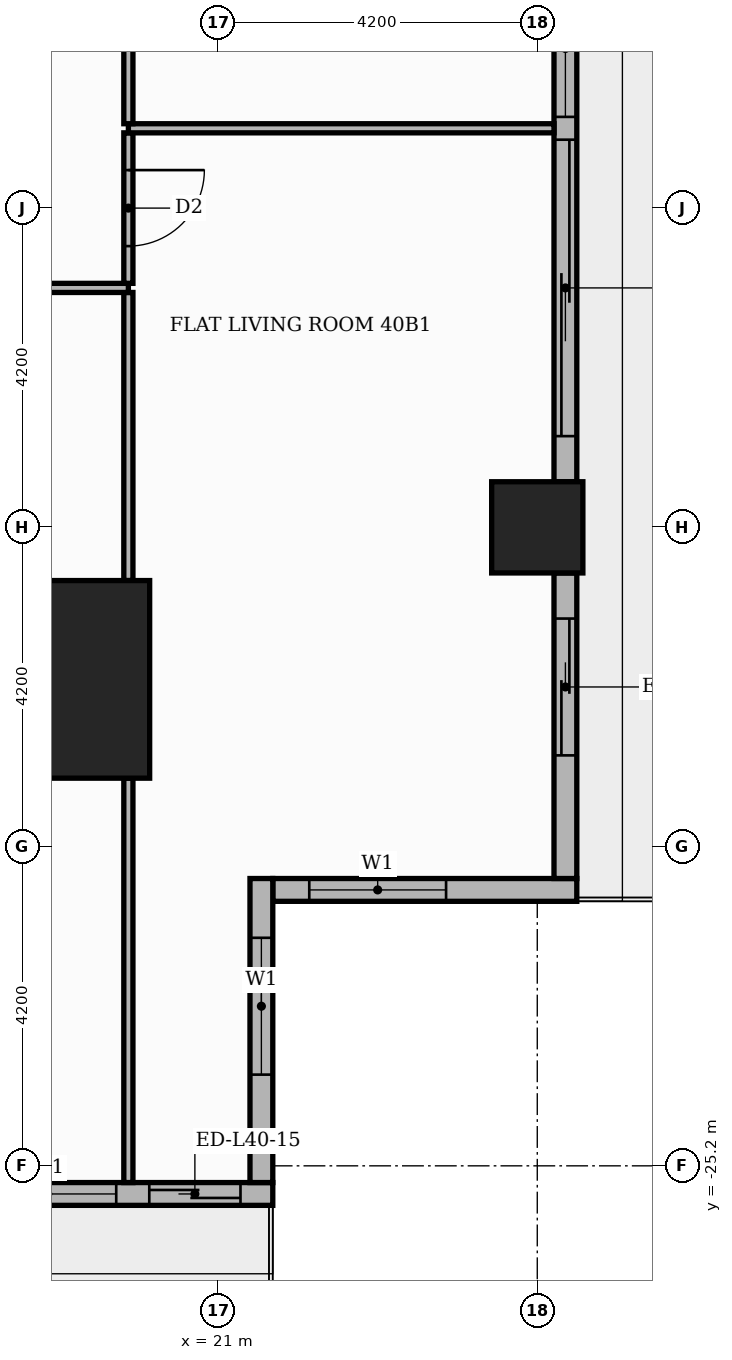
"""IFC4 building model, lengths in metres.
Left out: names, types, materials, properties, quantities, classifications, styles, units other than length and angle.
Written with IfcOpenShell. Run it as: python <this file> out.ifc"""

import sys

from ifc_helpers import new_model, si_unit, direction, frame, frame_2d, origin, origin_2d, place, context, subcontext, project, spatial, rectangle, extrude, element, fill, save


model = new_model("IFC4")
c1 = context("Model", 3, precision=1e-05, world=origin(), true_north=direction((0.0, 1.0)))
c2 = subcontext(c1, "Body", "Model", "MODEL_VIEW")
j1 = project(units=[si_unit("LENGTHUNIT", "METRE"), si_unit("PLANEANGLEUNIT", "RADIAN")], contexts=[c1])
p1 = place(None, origin())
s1 = spatial("IfcSite", under=j1, at=p1, CompositionType="ELEMENT")
p2 = place(p1, origin())
s2 = spatial("IfcBuilding", under=s1, at=p2, CompositionType="ELEMENT")
p3 = place(p2, frame((0.0, 0.0, 168.9)))
s3 = spatial("IfcBuildingStorey", under=s2, at=p3, CompositionType="ELEMENT", Elevation=168.9)
p4 = place(p3, frame((18.8, -18.8, 0.0), z_axis=(0.0, 0.0, 1.0), x_axis=(1.0, 0.0, 0.0)))
e1 = element("IfcColumn", 1, at=p4, inside=s3, PredefinedType="COLUMN", context=c2, shape_type="SweptSolid", body=[
    extrude(rectangle(XDim=2.6, YDim=2.6, at=origin_2d()), origin(), (0.0, 0.0, 1.0), 3.9),
])
p5 = place(p3, frame((25.2, -16.8, 0.0), z_axis=(0.0, 0.0, 1.0), x_axis=(1.0, 0.0, 0.0)))
e2 = element("IfcColumn", 2, at=p5, inside=s3, PredefinedType="COLUMN", context=c2, shape_type="SweptSolid", body=[
    extrude(rectangle(XDim=1.2, YDim=1.2, at=origin_2d()), origin(), (0.0, 0.0, 1.0), 3.9),
])
p6 = place(p3, frame((21.72, -21.57, 0.0), z_axis=(0.0, 0.0, 1.0), x_axis=(1.0, 0.0, 0.0)))
e3 = element("IfcWall", 3, at=p6, inside=s3, PredefinedType="STANDARD", context=c2, shape_type="SweptSolid", body=[
    extrude(rectangle(XDim=4.0, YDim=0.3, at=frame_2d((2.0, 0.0))), origin(), (0.0, 0.0, 1.0), 3.48),
])
p7 = place(p6, frame((0.48, 0.0, 0.9)))
e4 = element("IfcOpeningElement", 4, at=p7, cuts=e3, PredefinedType="OPENING", context=c2, shape_type="SweptSolid", body=[
    extrude(rectangle(XDim=1.8, YDim=2.1, at=frame_2d((0.9, 1.05))), frame((0.0, 0.16, 0.0), z_axis=(0.0, -1.0, 0.0), x_axis=(1.0, 0.0, 0.0)), (0.0, 0.0, 1.0), 0.32),
])
p8 = place(p3, frame((25.57, -21.42, 0.0), z_axis=(0.0, 0.0, 1.0), x_axis=(0.0, 1.0, 0.0)))
e5 = element("IfcWall", 5, at=p8, inside=s3, PredefinedType="STANDARD", context=c2, shape_type="SweptSolid", body=[
    extrude(rectangle(XDim=4.02, YDim=0.3, at=frame_2d((2.01, 0.0))), origin(), (0.0, 0.0, 1.0), 3.48),
])
p9 = place(p8, frame((1.62, 0.0, 0.0)))
e6 = element("IfcOpeningElement", 6, at=p9, cuts=e5, PredefinedType="OPENING", context=c2, shape_type="SweptSolid", body=[
    extrude(rectangle(XDim=1.8, YDim=2.4, at=frame_2d((0.9, 1.2))), frame((0.0, 0.16, 0.0), z_axis=(0.0, -1.0, 0.0), x_axis=(1.0, 0.0, 0.0)), (0.0, 0.0, 1.0), 0.32),
])
p10 = place(p3, frame((25.57, -16.2, 0.0), z_axis=(0.0, 0.0, 1.0), x_axis=(0.0, 1.0, 0.0)))
e7 = element("IfcWall", 7, at=p10, inside=s3, PredefinedType="STANDARD", context=c2, shape_type="SweptSolid", body=[
    extrude(rectangle(XDim=7.2, YDim=0.3, at=frame_2d((3.6, 0.0))), origin(), (0.0, 0.0, 1.0), 3.48),
])
p11 = place(p10, frame((0.6, 0.0, 0.0)))
e8 = element("IfcOpeningElement", 8, at=p11, cuts=e7, PredefinedType="OPENING", context=c2, shape_type="SweptSolid", body=[
    extrude(rectangle(XDim=3.9, YDim=2.4, at=frame_2d((1.95, 1.2))), frame((0.0, 0.16, 0.0), z_axis=(0.0, -1.0, 0.0), x_axis=(1.0, 0.0, 0.0)), (0.0, 0.0, 1.0), 0.32),
])
p12 = place(p10, frame((4.8, 0.0, 0.9)))
e9 = element("IfcOpeningElement", 9, at=p12, cuts=e7, PredefinedType="OPENING", context=c2, shape_type="SweptSolid", body=[
    extrude(rectangle(XDim=1.8, YDim=2.1, at=frame_2d((0.9, 1.05))), frame((0.0, 0.16, 0.0), z_axis=(0.0, -1.0, 0.0), x_axis=(1.0, 0.0, 0.0)), (0.0, 0.0, 1.0), 0.32),
])
p13 = place(p3, frame((17.4, -25.57, 0.0), z_axis=(0.0, 0.0, 1.0), x_axis=(1.0, 0.0, 0.0)))
e10 = element("IfcWall", 10, at=p13, inside=s3, PredefinedType="STANDARD", context=c2, shape_type="SweptSolid", body=[
    extrude(rectangle(XDim=4.32, YDim=0.3, at=frame_2d((2.16, 0.0))), origin(), (0.0, 0.0, 1.0), 3.48),
])
p14 = place(p13, frame((2.695, 0.0, 0.0)))
e11 = element("IfcOpeningElement", 11, at=p14, cuts=e10, PredefinedType="OPENING", context=c2, shape_type="SweptSolid", body=[
    extrude(rectangle(XDim=1.2, YDim=2.4, at=frame_2d((0.6, 1.2))), frame((0.0, 0.16, 0.0), z_axis=(0.0, -1.0, 0.0), x_axis=(1.0, 0.0, 0.0)), (0.0, 0.0, 1.0), 0.32),
])
p15 = place(p13, frame((0.46, 0.0, 0.9)))
e12 = element("IfcOpeningElement", 12, at=p15, cuts=e10, PredefinedType="OPENING", context=c2, shape_type="SweptSolid", body=[
    extrude(rectangle(XDim=1.8, YDim=2.1, at=frame_2d((0.9, 1.05))), frame((0.0, 0.16, 0.0), z_axis=(0.0, -1.0, 0.0), x_axis=(1.0, 0.0, 0.0)), (0.0, 0.0, 1.0), 0.32),
])
p16 = place(p3, frame((21.57, -25.42, 0.0), z_axis=(0.0, 0.0, 1.0), x_axis=(0.0, 1.0, 0.0)))
e13 = element("IfcWall", 13, at=p16, inside=s3, PredefinedType="STANDARD", context=c2, shape_type="SweptSolid", body=[
    extrude(rectangle(XDim=4.0, YDim=0.3, at=frame_2d((2.0, 0.0))), origin(), (0.0, 0.0, 1.0), 3.48),
])
p17 = place(p16, frame((1.42, 0.0, 0.9)))
e14 = element("IfcOpeningElement", 14, at=p17, cuts=e13, PredefinedType="OPENING", context=c2, shape_type="SweptSolid", body=[
    extrude(rectangle(XDim=1.8, YDim=2.1, at=frame_2d((0.9, 1.05))), frame((0.0, 0.16, 0.0), z_axis=(0.0, -1.0, 0.0), x_axis=(1.0, 0.0, 0.0)), (0.0, 0.0, 1.0), 0.32),
])
p18 = place(p3, frame((19.82, -25.42, 0.0), z_axis=(0.0, 0.0, 1.0), x_axis=(0.0, 1.0, 0.0)))
e15 = element("IfcWall", 15, at=p18, inside=s3, PredefinedType="PARTITIONING", context=c2, shape_type="SweptSolid", body=[
    extrude(rectangle(XDim=5.32, YDim=0.12, at=frame_2d((2.66, 0.0))), origin(), (0.0, 0.0, 1.0), 3.48),
])
p19 = place(p3, frame((19.82, -17.5, 0.0), z_axis=(0.0, 0.0, 1.0), x_axis=(0.0, 1.0, 0.0)))
e16 = element("IfcWall", 16, at=p19, inside=s3, PredefinedType="PARTITIONING", context=c2, shape_type="SweptSolid", body=[
    extrude(rectangle(XDim=3.79, YDim=0.12, at=frame_2d((1.895, 0.0))), origin(), (0.0, 0.0, 1.0), 3.48),
])
p20 = place(p3, frame((13.65, -13.65, 0.0), z_axis=(0.0, 0.0, 1.0), x_axis=(1.0, 0.0, 0.0)))
e17 = element("IfcWall", 17, at=p20, inside=s3, PredefinedType="PARTITIONING", context=c2, shape_type="SweptSolid", body=[
    extrude(rectangle(XDim=6.17, YDim=0.12, at=frame_2d((3.085, 0.0))), origin(), (0.0, 0.0, 1.0), 3.48),
])
p21 = place(p20, frame((2.635, 0.0, 0.0)))
e18 = element("IfcOpeningElement", 18, at=p21, cuts=e17, PredefinedType="OPENING", context=c2, shape_type="SweptSolid", body=[
    extrude(rectangle(XDim=0.9, YDim=2.1, at=frame_2d((0.45, 1.05))), frame((0.0, 0.07, 0.0), z_axis=(0.0, -1.0, 0.0), x_axis=(1.0, 0.0, 0.0)), (0.0, 0.0, 1.0), 0.14),
])
p22 = place(p3, frame((19.82, -13.59, 0.0), z_axis=(0.0, 0.0, 1.0), x_axis=(0.0, 1.0, 0.0)))
e19 = element("IfcWall", 19, at=p22, inside=s3, PredefinedType="PARTITIONING", context=c2, shape_type="SweptSolid", body=[
    extrude(rectangle(XDim=1.98, YDim=0.12, at=frame_2d((0.99, 0.0))), origin(), (0.0, 0.0, 1.0), 3.48),
])
p23 = place(p22, frame((0.49, 0.0, 0.0)))
e20 = element("IfcOpeningElement", 20, at=p23, cuts=e19, PredefinedType="OPENING", context=c2, shape_type="SweptSolid", body=[
    extrude(rectangle(XDim=1.0, YDim=2.1, at=frame_2d((0.5, 1.05))), frame((0.0, 0.07, 0.0), z_axis=(0.0, -1.0, 0.0), x_axis=(1.0, 0.0, 0.0)), (0.0, 0.0, 1.0), 0.14),
])
p24 = place(p3, frame((19.82, -11.55, 0.0), z_axis=(0.0, 0.0, 1.0), x_axis=(1.0, 0.0, 0.0)))
e21 = element("IfcWall", 21, at=p24, inside=s3, PredefinedType="PARTITIONING", context=c2, shape_type="SweptSolid", body=[
    extrude(rectangle(XDim=5.6, YDim=0.12, at=frame_2d((2.8, 0.0))), origin(), (0.0, 0.0, 1.0), 3.48),
])
p25 = place(p3, frame((19.82, -11.49, 0.0), z_axis=(0.0, 0.0, 1.0), x_axis=(0.0, 1.0, 0.0)))
e22 = element("IfcWall", 22, at=p25, inside=s3, PredefinedType="PARTITIONING", context=c2, shape_type="SweptSolid", body=[
    extrude(rectangle(XDim=4.08, YDim=0.12, at=frame_2d((2.04, 0.0))), origin(), (0.0, 0.0, 1.0), 3.48),
])
p26 = place(p25, frame((1.59, 0.0, 0.0)))
e23 = element("IfcOpeningElement", 23, at=p26, cuts=e22, PredefinedType="OPENING", context=c2, shape_type="SweptSolid", body=[
    extrude(rectangle(XDim=0.9, YDim=2.1, at=frame_2d((0.45, 1.05))), frame((0.0, 0.07, 0.0), z_axis=(0.0, -1.0, 0.0), x_axis=(1.0, 0.0, 0.0)), (0.0, 0.0, 1.0), 0.14),
])
p27 = place(p7, origin())
e24 = element("IfcWindow", 24, at=p27, inside=s3, PartitioningType="SINGLE_PANEL", PredefinedType="WINDOW", context=c2, shape_type="SweptSolid", body=[
    extrude(rectangle(XDim=1.8, YDim=2.1, at=frame_2d((0.9, 1.05))), frame((0.0, 0.03, 0.0), z_axis=(0.0, -1.0, 0.0), x_axis=(1.0, 0.0, 0.0)), (0.0, 0.0, 1.0), 0.06),
])
fill(e4, e24)
p28 = place(p9, origin())
e25 = element("IfcDoor", 25, at=p28, inside=s3, OperationType="SLIDING_TO_RIGHT", PredefinedType="DOOR", context=c2, shape_type="SweptSolid", body=[
    extrude(rectangle(XDim=1.8, YDim=2.4, at=frame_2d((0.9, 1.2))), frame((0.0, 0.025, 0.0), z_axis=(0.0, -1.0, 0.0), x_axis=(1.0, 0.0, 0.0)), (0.0, 0.0, 1.0), 0.05),
])
fill(e6, e25)
p29 = place(p11, origin())
e26 = element("IfcDoor", 26, at=p29, inside=s3, OperationType="SLIDING_TO_LEFT", PredefinedType="DOOR", context=c2, shape_type="SweptSolid", body=[
    extrude(rectangle(XDim=3.9, YDim=2.4, at=frame_2d((1.95, 1.2))), frame((0.0, 0.025, 0.0), z_axis=(0.0, -1.0, 0.0), x_axis=(1.0, 0.0, 0.0)), (0.0, 0.0, 1.0), 0.05),
])
fill(e8, e26)
p30 = place(p12, origin())
e27 = element("IfcWindow", 27, at=p30, inside=s3, PartitioningType="SINGLE_PANEL", PredefinedType="WINDOW", context=c2, shape_type="SweptSolid", body=[
    extrude(rectangle(XDim=1.8, YDim=2.1, at=frame_2d((0.9, 1.05))), frame((0.0, 0.03, 0.0), z_axis=(0.0, -1.0, 0.0), x_axis=(1.0, 0.0, 0.0)), (0.0, 0.0, 1.0), 0.06),
])
fill(e9, e27)
p31 = place(p14, origin())
e28 = element("IfcDoor", 28, at=p31, inside=s3, OperationType="SLIDING_TO_LEFT", PredefinedType="DOOR", context=c2, shape_type="SweptSolid", body=[
    extrude(rectangle(XDim=1.2, YDim=2.4, at=frame_2d((0.6, 1.2))), frame((0.0, 0.025, 0.0), z_axis=(0.0, -1.0, 0.0), x_axis=(1.0, 0.0, 0.0)), (0.0, 0.0, 1.0), 0.05),
])
fill(e11, e28)
p32 = place(p15, origin())
e29 = element("IfcWindow", 29, at=p32, inside=s3, PartitioningType="SINGLE_PANEL", PredefinedType="WINDOW", context=c2, shape_type="SweptSolid", body=[
    extrude(rectangle(XDim=1.8, YDim=2.1, at=frame_2d((0.9, 1.05))), frame((0.0, 0.03, 0.0), z_axis=(0.0, -1.0, 0.0), x_axis=(1.0, 0.0, 0.0)), (0.0, 0.0, 1.0), 0.06),
])
fill(e12, e29)
p33 = place(p17, origin())
e30 = element("IfcWindow", 30, at=p33, inside=s3, PartitioningType="SINGLE_PANEL", PredefinedType="WINDOW", context=c2, shape_type="SweptSolid", body=[
    extrude(rectangle(XDim=1.8, YDim=2.1, at=frame_2d((0.9, 1.05))), frame((0.0, 0.03, 0.0), z_axis=(0.0, -1.0, 0.0), x_axis=(1.0, 0.0, 0.0)), (0.0, 0.0, 1.0), 0.06),
])
fill(e14, e30)
p34 = place(p23, frame((1.0, 0.0, 0.0), z_axis=(0.0, 0.0, 1.0), x_axis=(-1.0, 0.0, 0.0)))
e31 = element("IfcDoor", 31, at=p34, inside=s3, OperationType="SINGLE_SWING_RIGHT", PredefinedType="DOOR", context=c2, shape_type="SweptSolid", body=[
    extrude(rectangle(XDim=1.0, YDim=2.1, at=frame_2d((0.5, 1.05))), frame((0.0, 0.025, 0.0), z_axis=(0.0, -1.0, 0.0), x_axis=(1.0, 0.0, 0.0)), (0.0, 0.0, 1.0), 0.05),
])
fill(e20, e31)
save(model, sys.argv[1])
